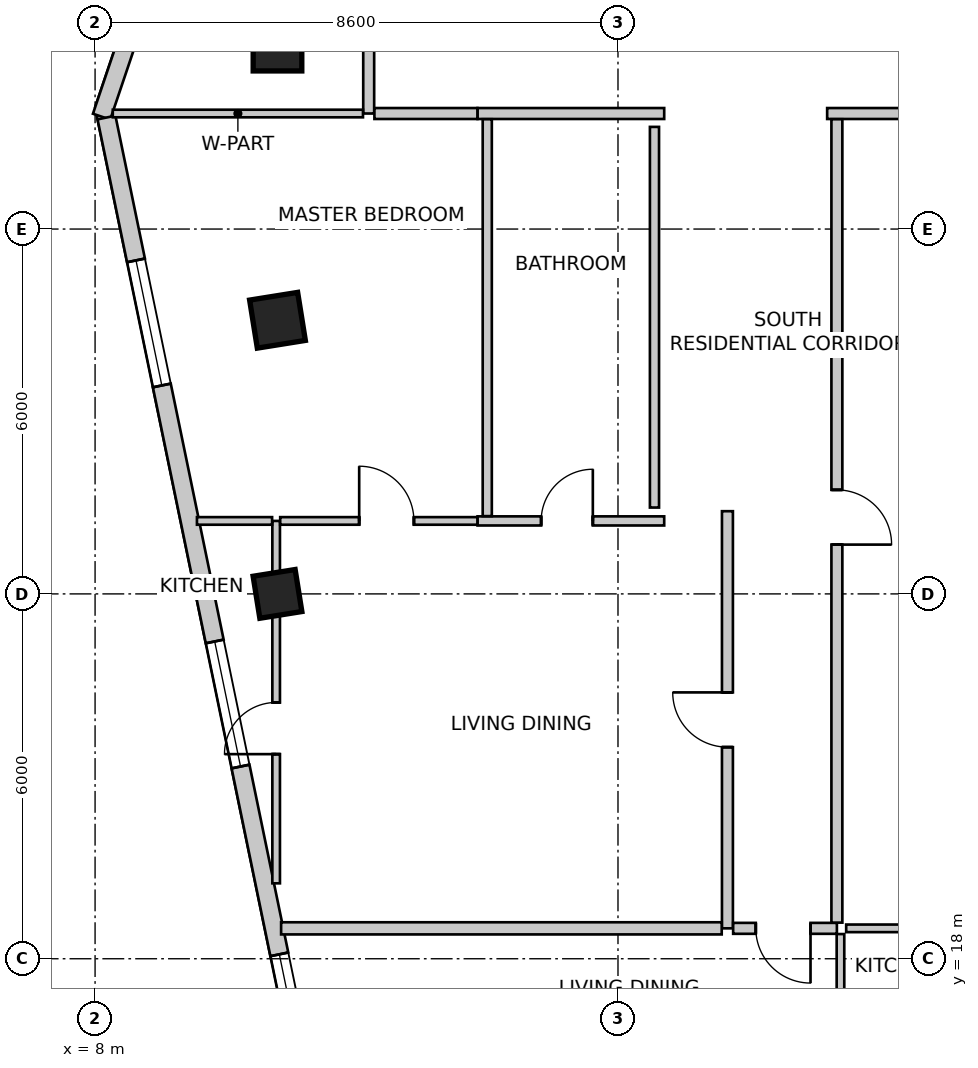
"""IFC4 building model, lengths in metres.
Left out: names, types, materials, properties, quantities, classifications, styles, units other than length and angle.
Written with IfcOpenShell. Run it as: python <this file> out.ifc"""

import sys

from ifc_helpers import new_model, si_unit, direction, frame, frame_2d, origin, origin_2d, place, context, subcontext, project, spatial, rectangle, extrude, source, transform, mapped, element, fill, save


model = new_model("IFC4")
c1 = context("Model", 3, precision=1e-05, world=origin(), true_north=direction((0.0, 1.0)))
c2 = subcontext(c1, "Body", "Model", "MODEL_VIEW")
j1 = project(units=[si_unit("LENGTHUNIT", "METRE"), si_unit("PLANEANGLEUNIT", "RADIAN")], contexts=[c1])
p1 = place(None, origin())
s1 = spatial("IfcSite", under=j1, at=p1, CompositionType="ELEMENT")
p2 = place(p1, origin())
s2 = spatial("IfcBuilding", under=s1, at=p2, CompositionType="ELEMENT")
p3 = place(p2, frame((0.0, 0.0, 193.9)))
s3 = spatial("IfcBuildingStorey", under=s2, at=p3, CompositionType="ELEMENT", Elevation=193.9)
m1 = source(origin(), c2, "Body", "SweptSolid", [
    extrude(rectangle(XDim=0.8, YDim=0.8, at=origin_2d()), origin(), (0.0, 0.0, 1.0), 3.5),
])
for number, where, z_axis, x_axis in (
    (1, (11.0, 33.0, 0.0), (0.0, 0.0, 1.0), (1.0, 0.0, 0.0)),
    (2, (11.0, 28.5, 0.0), (0.0, 0.0, 1.0), (0.158, -0.987, 0.0)),
):
    element("IfcColumn", number, at=place(p3, frame(where, z_axis=z_axis, x_axis=x_axis)), inside=s3, PredefinedType="COLUMN", context=c2, shape_type="MappedRepresentation", body=[
        mapped(m1, transform((0.0, 0.0, 0.0), scale=1.0)),
    ])
m2 = source(origin(), c2, "Body", "SweptSolid", [
    extrude(rectangle(XDim=0.7, YDim=0.7, at=origin_2d()), origin(), (0.0, 0.0, 1.0), 3.5),
])
p4 = place(p3, frame((11.0, 24.0, 0.0), z_axis=(0.0, 0.0, 1.0), x_axis=(0.158158067254, -0.987413806751, 0.0)))
e3 = element("IfcColumn", 3, at=p4, inside=s3, PredefinedType="COLUMN", context=c2, shape_type="MappedRepresentation", body=[
    mapped(m2, transform((0.0, 0.0, 0.0), scale=1.0)),
])
p5 = place(p3, frame((13.269, 47.134, 0.0), z_axis=(0.0, 0.0, 1.0), x_axis=(-0.319920776449, -0.947444297464, 0.0)))
e4 = element("IfcWall", 4, at=p5, inside=s3, PredefinedType="SOLIDWALL", context=c2, shape_type="SweptSolid", body=[
    extrude(rectangle(XDim=16.133, YDim=0.3, at=frame_2d((8.067, 0.0))), origin(), (0.0, 0.0, 1.0), 3.25),
])
m3 = source(origin(), c2, "Body", "SweptSolid", [
    extrude(rectangle(XDim=2.4, YDim=2.2, at=frame_2d((1.2, 1.1))), frame((0.0, 0.16, 0.0), z_axis=(0.0, -1.0, 0.0), x_axis=(1.0, 0.0, 0.0)), (0.0, 0.0, 1.0), 0.32),
])
p6 = place(p5, frame((2.363, 0.0, 0.85)))
e5 = element("IfcOpeningElement", 5, at=p6, cuts=e4, PredefinedType="OPENING", context=c2, shape_type="MappedRepresentation", body=[
    mapped(m3, transform((0.0, 0.0, 0.0), scale=1.0)),
])
m4 = source(origin(), c2, "Body", "SweptSolid", [
    extrude(rectangle(XDim=2.1, YDim=2.0, at=frame_2d((1.05, 1.0))), frame((0.0, 0.16, 0.0), z_axis=(0.0, -1.0, 0.0), x_axis=(1.0, 0.0, 0.0)), (0.0, 0.0, 1.0), 0.32),
])
p7 = place(p5, frame((7.41, 0.0, 0.85)))
e6 = element("IfcOpeningElement", 6, at=p7, cuts=e4, PredefinedType="OPENING", context=c2, shape_type="MappedRepresentation", body=[
    mapped(m4, transform((0.0, 0.0, 0.0), scale=1.0)),
])
p8 = place(p5, frame((12.157, 0.0, 0.85)))
e7 = element("IfcOpeningElement", 7, at=p8, cuts=e4, PredefinedType="OPENING", context=c2, shape_type="MappedRepresentation", body=[
    mapped(m3, transform((0.0, 0.0, 0.0), scale=1.0)),
])
p9 = place(p3, frame((8.188, 31.834, 0.0), z_axis=(0.0, 0.0, 1.0), x_axis=(0.202303475707, -0.979322880217, 0.0)))
e8 = element("IfcWall", 8, at=p9, inside=s3, PredefinedType="SOLIDWALL", context=c2, shape_type="SweptSolid", body=[
    extrude(rectangle(XDim=15.766, YDim=0.3, at=frame_2d((7.883, 0.0))), origin(), (0.0, 0.0, 1.0), 3.25),
])
p10 = place(p9, frame((2.399, 0.0, 0.85)))
e9 = element("IfcOpeningElement", 9, at=p10, cuts=e8, PredefinedType="OPENING", context=c2, shape_type="MappedRepresentation", body=[
    mapped(m4, transform((0.0, 0.0, 0.0), scale=1.0)),
])
p11 = place(p9, frame((8.798, 0.0, 0.85)))
e10 = element("IfcOpeningElement", 10, at=p11, cuts=e8, PredefinedType="OPENING", context=c2, shape_type="MappedRepresentation", body=[
    mapped(m4, transform((0.0, 0.0, 0.0), scale=1.0)),
])
m5 = source(origin(), c2, "Body", "SweptSolid", [
    extrude(rectangle(XDim=1.2, YDim=1.6, at=frame_2d((0.6, 0.8))), frame((0.0, 0.16, 0.0), z_axis=(0.0, -1.0, 0.0), x_axis=(1.0, 0.0, 0.0)), (0.0, 0.0, 1.0), 0.32),
])
p12 = place(p9, frame((14.052, 0.0, 0.85)))
e11 = element("IfcOpeningElement", 11, at=p12, cuts=e8, PredefinedType="OPENING", context=c2, shape_type="MappedRepresentation", body=[
    mapped(m5, transform((0.0, 0.0, 0.0), scale=1.0)),
])
p13 = place(p3, frame((12.5, 31.9, 0.0), z_axis=(0.0, 0.0, 1.0), x_axis=(0.0, 1.0, 0.0)))
e12 = element("IfcWall", 12, at=p13, inside=s3, PredefinedType="PARTITIONING", context=c2, shape_type="SweptSolid", body=[
    extrude(rectangle(XDim=1.556, YDim=0.18, at=frame_2d((0.778, 0.0))), origin(), (0.0, 0.0, 1.0), 2.835),
])
p14 = place(p3, frame((17.36, 31.9, 0.0), z_axis=(0.0, 0.0, 1.0), x_axis=(-1.0, 0.0, 0.0)))
e13 = element("IfcWall", 13, at=p14, inside=s3, PredefinedType="PARTITIONING", context=c2, shape_type="SweptSolid", body=[
    extrude(rectangle(XDim=3.07, YDim=0.18, at=frame_2d((1.535, 0.0))), origin(), (0.0, 0.0, 1.0), 2.835),
])
p15 = place(p3, frame((14.288, 31.9, 0.0), z_axis=(0.0, 0.0, 1.0), x_axis=(-1.0, 0.0, 0.0)))
e14 = element("IfcWall", 14, at=p15, inside=s3, PredefinedType="PARTITIONING", context=c2, shape_type="SweptSolid", body=[
    extrude(rectangle(XDim=1.694, YDim=0.18, at=frame_2d((0.847, 0.0))), origin(), (0.0, 0.0, 1.0), 2.835),
])
p16 = place(p3, frame((29.265, 31.9, 0.0), z_axis=(0.0, 0.0, 1.0), x_axis=(-1.0, 0.0, 0.0)))
e15 = element("IfcWall", 15, at=p16, inside=s3, PredefinedType="PARTITIONING", context=c2, shape_type="SweptSolid", body=[
    extrude(rectangle(XDim=9.225, YDim=0.18, at=frame_2d((4.613, 0.0))), origin(), (0.0, 0.0, 1.0), 2.835),
])
p17 = place(p3, frame((12.406, 31.9, 0.0), z_axis=(0.0, 0.0, 1.0), x_axis=(-1.0, 0.0, 0.0)))
e16 = element("IfcWall", 16, at=p17, inside=s3, PredefinedType="PARTITIONING", context=c2, shape_type="SweptSolid", body=[
    extrude(rectangle(XDim=4.115, YDim=0.125, at=frame_2d((2.057, 0.0))), origin(), (0.0, 0.0, 1.0), 2.542),
])
p18 = place(p3, frame((18.4, 18.5, 0.0), z_axis=(0.0, 0.0, 1.0), x_axis=(0.0, 1.0, 0.0)))
e17 = element("IfcWall", 17, at=p18, inside=s3, PredefinedType="PARTITIONING", context=c2, shape_type="SweptSolid", body=[
    extrude(rectangle(XDim=6.86, YDim=0.18, at=frame_2d((3.43, 0.0))), origin(), (0.0, 0.0, 1.0), 2.688),
])
m6 = source(origin(), c2, "Body", "SweptSolid", [
    extrude(rectangle(XDim=0.9, YDim=2.15, at=frame_2d((0.45, 1.075))), frame((0.0, 0.1, 0.0), z_axis=(0.0, -1.0, 0.0), x_axis=(1.0, 0.0, 0.0)), (0.0, 0.0, 1.0), 0.2),
])
p19 = place(p18, frame((2.98, 0.0, 0.0)))
e18 = element("IfcOpeningElement", 18, at=p19, cuts=e17, PredefinedType="OPENING", context=c2, shape_type="MappedRepresentation", body=[
    mapped(m6, transform((0.0, 0.0, 0.0), scale=1.0)),
])
p20 = place(p3, frame((20.2, 18.5, 0.0), z_axis=(0.0, 0.0, 1.0), x_axis=(-1.0, 0.0, 0.0)))
e19 = element("IfcWall", 19, at=p20, inside=s3, PredefinedType="PARTITIONING", context=c2, shape_type="SweptSolid", body=[
    extrude(rectangle(XDim=1.706, YDim=0.18, at=frame_2d((0.853, 0.0))), origin(), (0.0, 0.0, 1.0), 3.25),
])
p21 = place(p20, frame((0.434, 0.0, 0.0)))
e20 = element("IfcOpeningElement", 20, at=p21, cuts=e19, PredefinedType="OPENING", context=c2, shape_type="MappedRepresentation", body=[
    mapped(m6, transform((0.0, 0.0, 0.0), scale=1.0)),
])
p22 = place(p3, frame((20.2, 31.806, 0.0), z_axis=(0.0, 0.0, 1.0), x_axis=(0.0, -1.0, 0.0)))
e21 = element("IfcWall", 21, at=p22, inside=s3, PredefinedType="PARTITIONING", context=c2, shape_type="SweptSolid", body=[
    extrude(rectangle(XDim=13.212, YDim=0.18, at=frame_2d((6.606, 0.0))), origin(), (0.0, 0.0, 1.0), 2.688),
])
p23 = place(p22, frame((6.095, 0.0, 0.0)))
e22 = element("IfcOpeningElement", 22, at=p23, cuts=e21, PredefinedType="OPENING", context=c2, shape_type="MappedRepresentation", body=[
    mapped(m6, transform((0.0, 0.0, 0.0), scale=1.0)),
])
p24 = place(p3, frame((10.978, 19.24, 0.0), z_axis=(0.0, 0.0, 1.0), x_axis=(0.0, 1.0, 0.0)))
e23 = element("IfcWall", 23, at=p24, inside=s3, PredefinedType="PARTITIONING", context=c2, shape_type="SweptSolid", body=[
    extrude(rectangle(XDim=5.96, YDim=0.125, at=frame_2d((2.98, 0.0))), origin(), (0.0, 0.0, 1.0), 2.542),
])
m7 = source(origin(), c2, "Body", "SweptSolid", [
    extrude(rectangle(XDim=0.85, YDim=2.15, at=frame_2d((0.425, 1.075))), frame((0.0, 0.073, 0.0), z_axis=(0.0, -1.0, 0.0), x_axis=(1.0, 0.0, 0.0)), (0.0, 0.0, 1.0), 0.145),
])
p25 = place(p24, frame((2.125, 0.0, 0.0)))
e24 = element("IfcOpeningElement", 24, at=p25, cuts=e23, PredefinedType="OPENING", context=c2, shape_type="MappedRepresentation", body=[
    mapped(m7, transform((0.0, 0.0, 0.0), scale=1.0)),
])
p26 = place(p3, frame((14.29, 25.2, 0.0), z_axis=(0.0, 0.0, 1.0), x_axis=(1.0, 0.0, 0.0)))
e25 = element("IfcWall", 25, at=p26, inside=s3, PredefinedType="PARTITIONING", context=c2, shape_type="SweptSolid", body=[
    extrude(rectangle(XDim=3.07, YDim=0.15, at=frame_2d((1.535, 0.0))), origin(), (0.0, 0.0, 1.0), 2.688),
])
m8 = source(origin(), c2, "Body", "SweptSolid", [
    extrude(rectangle(XDim=0.85, YDim=2.15, at=frame_2d((0.425, 1.075))), frame((0.0, 0.085, 0.0), z_axis=(0.0, -1.0, 0.0), x_axis=(1.0, 0.0, 0.0)), (0.0, 0.0, 1.0), 0.17),
])
p27 = place(p26, frame((1.046, 0.0, 0.0)))
e26 = element("IfcOpeningElement", 26, at=p27, cuts=e25, PredefinedType="OPENING", context=c2, shape_type="MappedRepresentation", body=[
    mapped(m8, transform((0.0, 0.0, 0.0), scale=1.0)),
])
p28 = place(p3, frame((11.044, 25.2, 0.0), z_axis=(0.0, 0.0, 1.0), x_axis=(1.0, 0.0, 0.0)))
e27 = element("IfcWall", 27, at=p28, inside=s3, PredefinedType="PARTITIONING", context=c2, shape_type="SweptSolid", body=[
    extrude(rectangle(XDim=3.244, YDim=0.125, at=frame_2d((1.622, 0.0))), origin(), (0.0, 0.0, 1.0), 2.542),
])
m9 = source(origin(), c2, "Body", "SweptSolid", [
    extrude(rectangle(XDim=0.9, YDim=2.15, at=frame_2d((0.45, 1.075))), frame((0.0, 0.073, 0.0), z_axis=(0.0, -1.0, 0.0), x_axis=(1.0, 0.0, 0.0)), (0.0, 0.0, 1.0), 0.145),
])
p29 = place(p28, frame((1.299, 0.0, 0.0)))
e28 = element("IfcOpeningElement", 28, at=p29, cuts=e27, PredefinedType="OPENING", context=c2, shape_type="MappedRepresentation", body=[
    mapped(m9, transform((0.0, 0.0, 0.0), scale=1.0)),
])
p30 = place(p3, frame((18.306, 18.5, 0.0), z_axis=(0.0, 0.0, 1.0), x_axis=(-1.0, 0.0, 0.0)))
e29 = element("IfcWall", 29, at=p30, inside=s3, PredefinedType="PARTITIONING", context=c2, shape_type="SweptSolid", body=[
    extrude(rectangle(XDim=7.246, YDim=0.2, at=frame_2d((3.623, 0.0))), origin(), (0.0, 0.0, 1.0), 3.25),
])
p31 = place(p3, frame((9.675, 25.2, 0.0), z_axis=(0.0, 0.0, 1.0), x_axis=(1.0, 0.0, 0.0)))
e30 = element("IfcWall", 30, at=p31, inside=s3, PredefinedType="PARTITIONING", context=c2, shape_type="SweptSolid", body=[
    extrude(rectangle(XDim=1.236, YDim=0.125, at=frame_2d((0.618, 0.0))), origin(), (0.0, 0.0, 1.0), 2.542),
])
p32 = place(p3, frame((14.45, 25.279, 0.0), z_axis=(0.0, 0.0, 1.0), x_axis=(0.0, 1.0, 0.0)))
e31 = element("IfcWall", 31, at=p32, inside=s3, PredefinedType="PARTITIONING", context=c2, shape_type="SweptSolid", body=[
    extrude(rectangle(XDim=6.527, YDim=0.15, at=frame_2d((3.263, 0.0))), origin(), (0.0, 0.0, 1.0), 2.688),
])
p33 = place(p3, frame((20.259, 18.406, 0.0), z_axis=(0.0, 0.0, 1.0), x_axis=(0.0, -1.0, 0.0)))
e32 = element("IfcWall", 32, at=p33, inside=s3, PredefinedType="PARTITIONING", context=c2, shape_type="SweptSolid", body=[
    extrude(rectangle(XDim=3.091, YDim=0.125, at=frame_2d((1.545, 0.0))), origin(), (0.0, 0.0, 1.0), 2.688),
])
p34 = place(p33, frame((1.121, 0.0, 0.0)))
e33 = element("IfcOpeningElement", 33, at=p34, cuts=e32, PredefinedType="OPENING", context=c2, shape_type="MappedRepresentation", body=[
    mapped(m7, transform((0.0, 0.0, 0.0), scale=1.0)),
])
p35 = place(p3, frame((20.353, 18.5, 0.0), z_axis=(0.0, 0.0, 1.0), x_axis=(1.0, 0.0, 0.0)))
e34 = element("IfcWall", 34, at=p35, inside=s3, PredefinedType="PARTITIONING", context=c2, shape_type="SweptSolid", body=[
    extrude(rectangle(XDim=3.439, YDim=0.125, at=frame_2d((1.72, 0.0))), origin(), (0.0, 0.0, 1.0), 2.542),
])
p36 = place(p3, frame((17.2, 31.68, 0.0), z_axis=(0.0, 0.0, 1.0), x_axis=(0.0, -1.0, 0.0)))
e35 = element("IfcWall", 35, at=p36, inside=s3, PredefinedType="PARTITIONING", context=c2, shape_type="SweptSolid", body=[
    extrude(rectangle(XDim=6.26, YDim=0.15, at=frame_2d((3.13, 0.0))), origin(), (0.0, 0.0, 1.0), 2.688),
])
m10 = source(origin(), c2, "Body", "SweptSolid", [
    extrude(rectangle(XDim=2.1, YDim=2.0, at=frame_2d((1.05, 1.0))), frame((0.0, -0.015, 0.0), z_axis=(0.0, -1.0, 0.0), x_axis=(1.0, 0.0, 0.0)), (0.0, 0.0, 1.0), 0.06),
])
p37 = place(p10, origin())
e36 = element("IfcWindow", 36, at=p37, inside=s3, PartitioningType="SINGLE_PANEL", PredefinedType="WINDOW", context=c2, shape_type="MappedRepresentation", body=[
    mapped(m10, transform((0.0, 0.0, 0.0), scale=1.0)),
])
fill(e9, e36)
p38 = place(p11, origin())
e37 = element("IfcWindow", 37, at=p38, inside=s3, PartitioningType="SINGLE_PANEL", PredefinedType="WINDOW", context=c2, shape_type="MappedRepresentation", body=[
    mapped(m10, transform((0.0, 0.0, 0.0), scale=1.0)),
])
fill(e10, e37)
m11 = source(origin(), c2, "Body", "SweptSolid", [
    extrude(rectangle(XDim=1.2, YDim=1.6, at=frame_2d((0.6, 0.8))), frame((0.0, -0.015, 0.0), z_axis=(0.0, -1.0, 0.0), x_axis=(1.0, 0.0, 0.0)), (0.0, 0.0, 1.0), 0.06),
])
p39 = place(p12, origin())
e38 = element("IfcWindow", 38, at=p39, inside=s3, PartitioningType="SINGLE_PANEL", PredefinedType="WINDOW", context=c2, shape_type="MappedRepresentation", body=[
    mapped(m11, transform((0.0, 0.0, 0.0), scale=1.0)),
])
fill(e11, e38)
m12 = source(origin(), c2, "Body", "SweptSolid", [
    extrude(rectangle(XDim=0.9, YDim=2.15, at=frame_2d((0.45, 1.075))), frame((0.0, 0.025, 0.0), z_axis=(0.0, -1.0, 0.0), x_axis=(1.0, 0.0, 0.0)), (0.0, 0.0, 1.0), 0.05),
])
p40 = place(p19, origin())
e39 = element("IfcDoor", 39, at=p40, inside=s3, OperationType="SINGLE_SWING_RIGHT", PredefinedType="DOOR", context=c2, shape_type="MappedRepresentation", body=[
    mapped(m12, transform((0.0, 0.0, 0.0), scale=1.0)),
])
fill(e18, e39)
m13 = source(origin(), c2, "Body", "SweptSolid", [
    extrude(rectangle(XDim=0.85, YDim=2.15, at=frame_2d((0.425, 1.075))), frame((0.0, 0.025, 0.0), z_axis=(0.0, -1.0, 0.0), x_axis=(1.0, 0.0, 0.0)), (0.0, 0.0, 1.0), 0.05),
])
p41 = place(p25, origin())
e40 = element("IfcDoor", 40, at=p41, inside=s3, OperationType="SINGLE_SWING_LEFT", PredefinedType="DOOR", context=c2, shape_type="MappedRepresentation", body=[
    mapped(m13, transform((0.0, 0.0, 0.0), scale=1.0)),
])
fill(e24, e40)
p42 = place(p27, origin())
e41 = element("IfcDoor", 41, at=p42, inside=s3, OperationType="SINGLE_SWING_RIGHT", PredefinedType="DOOR", context=c2, shape_type="MappedRepresentation", body=[
    mapped(m13, transform((0.0, 0.0, 0.0), scale=1.0)),
])
fill(e26, e41)
m14 = source(origin(), c2, "Body", "SweptSolid", [
    extrude(rectangle(XDim=0.9, YDim=2.15, at=frame_2d((0.45, 1.075))), frame((0.0, 0.025, 0.0), z_axis=(0.0, -1.0, 0.0), x_axis=(1.0, 0.0, 0.0)), (0.0, 0.0, 1.0), 0.05),
])
p43 = place(p29, origin())
e42 = element("IfcDoor", 42, at=p43, inside=s3, OperationType="SINGLE_SWING_LEFT", PredefinedType="DOOR", context=c2, shape_type="MappedRepresentation", body=[
    mapped(m14, transform((0.0, 0.0, 0.0), scale=1.0)),
])
fill(e28, e42)
p44 = place(p21, origin())
e43 = element("IfcDoor", 43, at=p44, inside=s3, OperationType="SINGLE_SWING_LEFT", PredefinedType="DOOR", context=c2, shape_type="MappedRepresentation", body=[
    mapped(m12, transform((0.0, 0.0, 0.0), scale=1.0)),
])
fill(e20, e43)
p45 = place(p23, origin())
e44 = element("IfcDoor", 44, at=p45, inside=s3, OperationType="SINGLE_SWING_RIGHT", PredefinedType="DOOR", context=c2, shape_type="MappedRepresentation", body=[
    mapped(m14, transform((0.0, 0.0, 0.0), scale=1.0)),
])
fill(e22, e44)
save(model, sys.argv[1])
